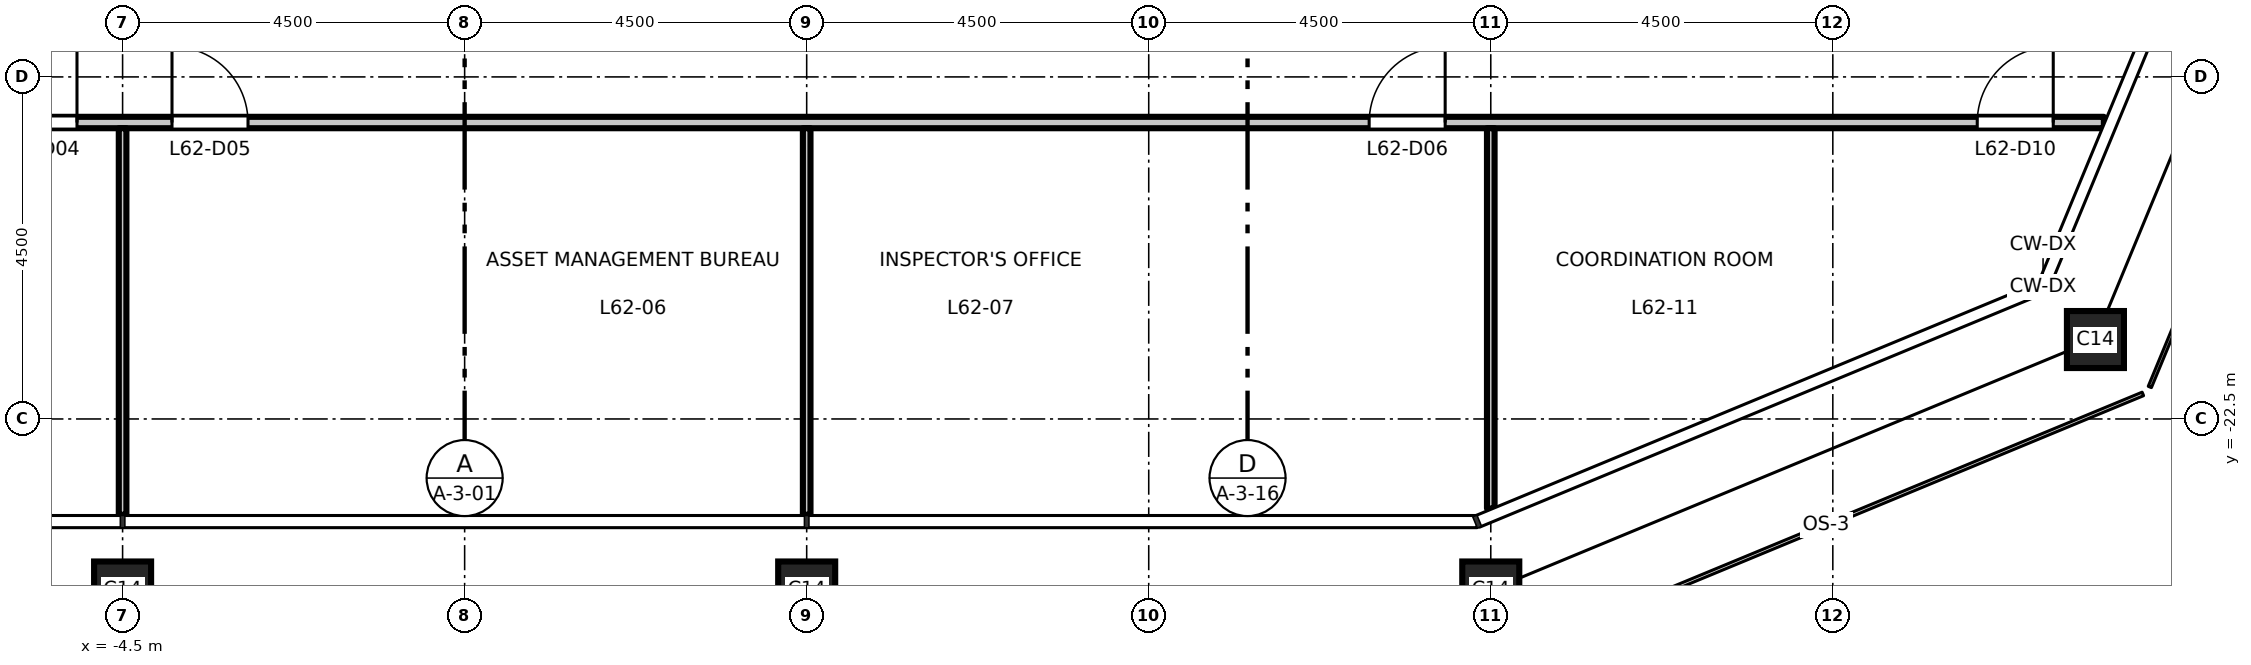
"""IFC4 building model, lengths in metres.
Left out: names, types, materials, properties, quantities, classifications, styles, units other than length and angle.
Written with IfcOpenShell. Run it as: python <this file> out.ifc"""

import sys

from ifc_helpers import new_model, si_unit, direction, frame, frame_2d, origin, origin_2d, place, context, subcontext, project, spatial, rectangle, hollow_rectangle, extrude, element, fill, save


model = new_model("IFC4")
c1 = context("Model", 3, precision=1e-05, world=origin(), true_north=direction((0.0, 1.0)))
c2 = subcontext(c1, "Body", "Model", "MODEL_VIEW")
j1 = project(units=[si_unit("LENGTHUNIT", "METRE"), si_unit("PLANEANGLEUNIT", "RADIAN")], contexts=[c1])
p1 = place(None, origin())
s1 = spatial("IfcSite", under=j1, at=p1, CompositionType="ELEMENT")
p2 = place(p1, origin())
s2 = spatial("IfcBuilding", under=s1, at=p2, CompositionType="ELEMENT")
p3 = place(p2, frame((0.0, 0.0, 289.7)))
s3 = spatial("IfcBuildingStorey", under=s2, at=p3, CompositionType="ELEMENT", Elevation=289.7)
for number, where, z_axis, x_axis in (
    (1, (-4.5, -24.75, 0.0), (0.0, 0.0, 1.0), (1.0, 0.0, 0.0)),
    (2, (4.5, -24.75, 0.0), (0.0, 0.0, 1.0), (1.0, 0.0, 0.0)),
    (3, (13.5, -24.75, 0.0), (0.0, 0.0, 1.0), (1.0, 0.0, 0.0)),
    (4, (21.455, -21.455, 0.0), (0.0, 0.0, 1.0), (1.0, 0.0, 0.0)),
):
    element("IfcColumn", number, at=place(p3, frame(where, z_axis=z_axis, x_axis=x_axis)), inside=s3, PredefinedType="COLUMN", context=c2, shape_type="SweptSolid", body=[
        extrude(hollow_rectangle(XDim=0.75, YDim=0.75, WallThickness=0.04, at=origin_2d()), origin(), (0.0, 0.0, 1.0), 4.5),
    ])
p4 = place(p3, frame((-21.566, -18.6, 0.0), z_axis=(0.0, 0.0, 1.0), x_axis=(1.0, 0.0, 0.0)))
e5 = element("IfcWall", 5, at=p4, inside=s3, PredefinedType="PARTITIONING", context=c2, shape_type="SweptSolid", body=[
    extrude(rectangle(XDim=43.132, YDim=0.15, at=frame_2d((21.566, 0.0))), origin(), (0.0, 0.0, 1.0), 4.35),
])
p5 = place(p4, frame((15.466, 0.0, 0.0)))
e6 = element("IfcOpeningElement", 6, at=p5, cuts=e5, PredefinedType="OPENING", context=c2, shape_type="SweptSolid", body=[
    extrude(rectangle(XDim=1.0, YDim=2.1, at=frame_2d((0.5, 1.05))), frame((0.0, 0.085, 0.0), z_axis=(0.0, -1.0, 0.0), x_axis=(1.0, 0.0, 0.0)), (0.0, 0.0, 1.0), 0.17),
])
p6 = place(p4, frame((17.716, 0.0, 0.0)))
e7 = element("IfcOpeningElement", 7, at=p6, cuts=e5, PredefinedType="OPENING", context=c2, shape_type="SweptSolid", body=[
    extrude(rectangle(XDim=1.0, YDim=2.1, at=frame_2d((0.5, 1.05))), frame((0.0, 0.085, 0.0), z_axis=(0.0, -1.0, 0.0), x_axis=(1.0, 0.0, 0.0)), (0.0, 0.0, 1.0), 0.17),
])
p7 = place(p4, frame((33.466, 0.0, 0.0)))
e8 = element("IfcOpeningElement", 8, at=p7, cuts=e5, PredefinedType="OPENING", context=c2, shape_type="SweptSolid", body=[
    extrude(rectangle(XDim=1.0, YDim=2.1, at=frame_2d((0.5, 1.05))), frame((0.0, 0.085, 0.0), z_axis=(0.0, -1.0, 0.0), x_axis=(1.0, 0.0, 0.0)), (0.0, 0.0, 1.0), 0.17),
])
p8 = place(p4, frame((0.65, 0.0, 0.0)))
e9 = element("IfcOpeningElement", 9, at=p8, cuts=e5, PredefinedType="OPENING", context=c2, shape_type="SweptSolid", body=[
    extrude(rectangle(XDim=1.0, YDim=2.1, at=frame_2d((0.5, 1.05))), frame((0.0, 0.085, 0.0), z_axis=(0.0, -1.0, 0.0), x_axis=(1.0, 0.0, 0.0)), (0.0, 0.0, 1.0), 0.17),
])
p9 = place(p4, frame((41.466, 0.0, 0.0)))
e10 = element("IfcOpeningElement", 10, at=p9, cuts=e5, PredefinedType="OPENING", context=c2, shape_type="SweptSolid", body=[
    extrude(rectangle(XDim=1.0, YDim=2.1, at=frame_2d((0.5, 1.05))), frame((0.0, 0.085, 0.0), z_axis=(0.0, -1.0, 0.0), x_axis=(1.0, 0.0, 0.0)), (0.0, 0.0, 1.0), 0.17),
])
for number, where, z_axis, x_axis in (
    (11, (-4.5, -23.76, 0.0), (0.0, 0.0, 1.0), (0.0, 1.0, 0.0)),
    (12, (4.5, -23.76, 0.0), (0.0, 0.0, 1.0), (0.0, 1.0, 0.0)),
):
    element("IfcWall", number, at=place(p3, frame(where, z_axis=z_axis, x_axis=x_axis)), inside=s3, PredefinedType="PARTITIONING", context=c2, shape_type="SweptSolid", body=[
        extrude(rectangle(XDim=5.085, YDim=0.1, at=frame_2d((2.542, 0.0))), origin(), (0.0, 0.0, 1.0), 3.65),
    ])
p10 = place(p3, frame((13.5, -23.678, 0.0), z_axis=(0.0, 0.0, 1.0), x_axis=(0.0, 1.0, 0.0)))
e13 = element("IfcWall", 13, at=p10, inside=s3, PredefinedType="PARTITIONING", context=c2, shape_type="SweptSolid", body=[
    extrude(rectangle(XDim=5.003, YDim=0.1, at=frame_2d((2.501, 0.0))), origin(), (0.0, 0.0, 1.0), 3.75),
])
p11 = place(p5, origin())
e14 = element("IfcDoor", 14, at=p11, inside=s3, OperationType="SINGLE_SWING_RIGHT", PredefinedType="DOOR", context=c2, shape_type="SweptSolid", body=[
    extrude(rectangle(XDim=1.0, YDim=2.1, at=frame_2d((0.5, 1.05))), frame((0.0, 0.025, 0.0), z_axis=(0.0, -1.0, 0.0), x_axis=(1.0, 0.0, 0.0)), (0.0, 0.0, 1.0), 0.05),
])
fill(e6, e14)
p12 = place(p6, origin())
e15 = element("IfcDoor", 15, at=p12, inside=s3, OperationType="SINGLE_SWING_LEFT", PredefinedType="DOOR", context=c2, shape_type="SweptSolid", body=[
    extrude(rectangle(XDim=1.0, YDim=2.1, at=frame_2d((0.5, 1.05))), frame((0.0, 0.025, 0.0), z_axis=(0.0, -1.0, 0.0), x_axis=(1.0, 0.0, 0.0)), (0.0, 0.0, 1.0), 0.05),
])
fill(e7, e15)
p13 = place(p7, origin())
e16 = element("IfcDoor", 16, at=p13, inside=s3, OperationType="SINGLE_SWING_RIGHT", PredefinedType="DOOR", context=c2, shape_type="SweptSolid", body=[
    extrude(rectangle(XDim=1.0, YDim=2.1, at=frame_2d((0.5, 1.05))), frame((0.0, 0.025, 0.0), z_axis=(0.0, -1.0, 0.0), x_axis=(1.0, 0.0, 0.0)), (0.0, 0.0, 1.0), 0.05),
])
fill(e8, e16)
p14 = place(p9, origin())
e17 = element("IfcDoor", 17, at=p14, inside=s3, OperationType="SINGLE_SWING_RIGHT", PredefinedType="DOOR", context=c2, shape_type="SweptSolid", body=[
    extrude(rectangle(XDim=1.0, YDim=2.1, at=frame_2d((0.5, 1.05))), frame((0.0, 0.025, 0.0), z_axis=(0.0, -1.0, 0.0), x_axis=(1.0, 0.0, 0.0)), (0.0, 0.0, 1.0), 0.05),
])
fill(e10, e17)
save(model, sys.argv[1])
